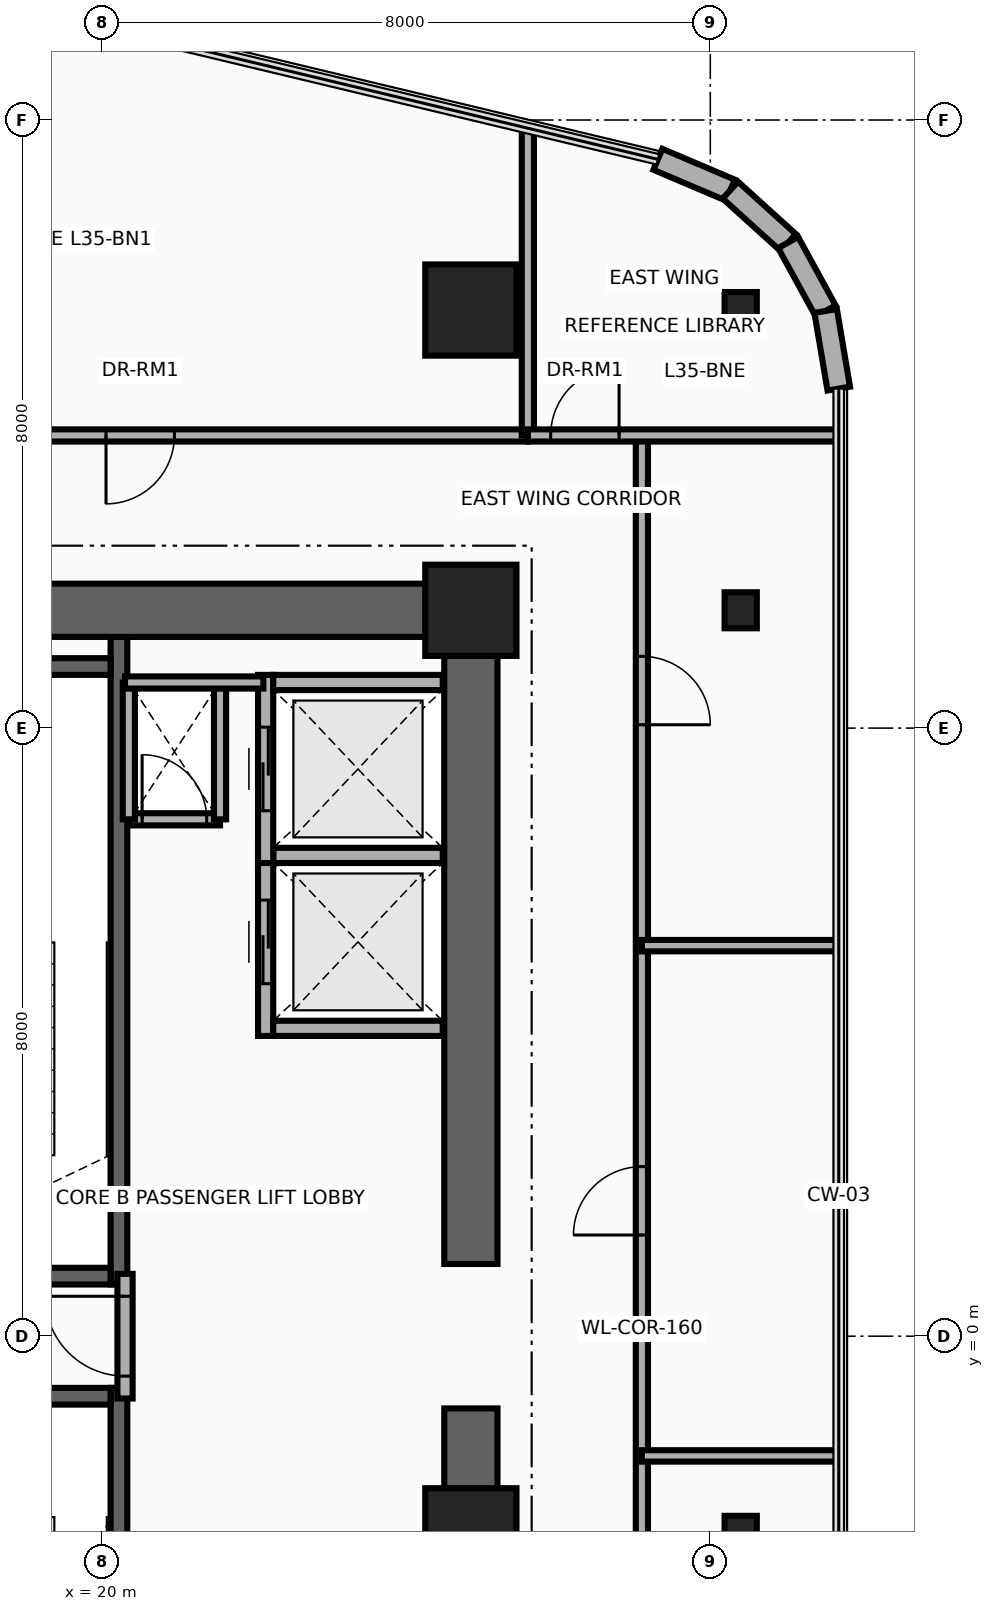
"""IFC4 building model, lengths in metres.
Left out: names, types, materials, properties, quantities, classifications, styles, units other than length and angle.
Written with IfcOpenShell. Run it as: python <this file> out.ifc"""

import sys

from ifc_helpers import new_model, si_unit, direction, frame, frame_2d, origin, origin_2d, place, context, subcontext, project, spatial, rectangle, i_section, extrude, source, transform, mapped, element, fill, save


model = new_model("IFC4")
c1 = context("Model", 3, precision=1e-05, world=origin(), true_north=direction((0.0, 1.0)))
c2 = subcontext(c1, "Body", "Model", "MODEL_VIEW")
j1 = project(units=[si_unit("LENGTHUNIT", "METRE"), si_unit("PLANEANGLEUNIT", "RADIAN")], contexts=[c1])
p1 = place(None, origin())
s1 = spatial("IfcSite", under=j1, at=p1, CompositionType="ELEMENT")
p2 = place(p1, origin())
s2 = spatial("IfcBuilding", under=s1, at=p2, CompositionType="ELEMENT")
p3 = place(p2, frame((0.0, 0.0, 139.0)))
s3 = spatial("IfcBuildingStorey", under=s2, at=p3, CompositionType="ELEMENT", Elevation=139.0)
p4 = place(p3, frame((20.22, 0.68, 0.0), z_axis=(0.0, 0.0, 1.0), x_axis=(0.0, 1.0, 0.0)))
e1 = element("IfcWall", 1, at=p4, inside=s3, PredefinedType="SHEAR", context=c2, shape_type="SweptSolid", body=[
    extrude(rectangle(XDim=8.52, YDim=0.22, at=frame_2d((4.26, 0.0))), origin(), (0.0, 0.0, 1.0), 3.46),
])
p5 = place(p3, frame((17.0, 0.79, 0.0), z_axis=(0.0, 0.0, 1.0), x_axis=(1.0, 0.0, 0.0)))
e2 = element("IfcWall", 2, at=p5, inside=s3, PredefinedType="SHEAR", context=c2, shape_type="SweptSolid", body=[
    extrude(rectangle(XDim=3.11, YDim=0.22, at=frame_2d((1.555, 0.0))), origin(), (0.0, 0.0, 1.0), 3.46),
])
p6 = place(p5, frame((0.95, 0.0, 0.0)))
e3 = element("IfcOpeningElement", 3, at=p6, cuts=e2, PredefinedType="OPENING", context=c2, shape_type="SweptSolid", body=[
    extrude(rectangle(XDim=1.1, YDim=2.15, at=frame_2d((0.55, 1.075))), frame((0.0, 0.125, 0.0), z_axis=(0.0, -1.0, 0.0), x_axis=(1.0, 0.0, 0.0)), (0.0, 0.0, 1.0), 0.25),
])
p7 = place(p3, frame((17.0, 8.81, 0.0), z_axis=(0.0, 0.0, 1.0), x_axis=(1.0, 0.0, 0.0)))
e4 = element("IfcWall", 4, at=p7, inside=s3, PredefinedType="SHEAR", context=c2, shape_type="SweptSolid", body=[
    extrude(rectangle(XDim=3.11, YDim=0.22, at=frame_2d((1.555, 0.0))), origin(), (0.0, 0.0, 1.0), 3.46),
])
p8 = place(p3, frame((20.22, -9.2, 0.0), z_axis=(0.0, 0.0, 1.0), x_axis=(0.0, 1.0, 0.0)))
e5 = element("IfcWall", 5, at=p8, inside=s3, PredefinedType="SHEAR", context=c2, shape_type="SweptSolid", body=[
    extrude(rectangle(XDim=8.52, YDim=0.22, at=frame_2d((4.26, 0.0))), origin(), (0.0, 0.0, 1.0), 3.46),
])
p9 = place(p3, frame((17.0, -0.79, 0.0), z_axis=(0.0, 0.0, 1.0), x_axis=(1.0, 0.0, 0.0)))
e6 = element("IfcWall", 6, at=p9, inside=s3, PredefinedType="SHEAR", context=c2, shape_type="SweptSolid", body=[
    extrude(rectangle(XDim=3.11, YDim=0.22, at=frame_2d((1.555, 0.0))), origin(), (0.0, 0.0, 1.0), 3.46),
])
p10 = place(p9, frame((0.95, 0.0, 0.0)))
e7 = element("IfcOpeningElement", 7, at=p10, cuts=e6, PredefinedType="OPENING", context=c2, shape_type="SweptSolid", body=[
    extrude(rectangle(XDim=1.1, YDim=2.15, at=frame_2d((0.55, 1.075))), frame((0.0, 0.125, 0.0), z_axis=(0.0, -1.0, 0.0), x_axis=(1.0, 0.0, 0.0)), (0.0, 0.0, 1.0), 0.25),
])
for number, where, z_axis, x_axis in (
    (8, (24.85, -9.9, 0.0), (0.0, 0.0, 1.0), (0.0, 1.0, 0.0)),
    (9, (24.85, 0.95, 0.0), (0.0, 0.0, 1.0), (0.0, 1.0, 0.0)),
):
    element("IfcWall", number, at=place(p3, frame(where, z_axis=z_axis, x_axis=x_axis)), inside=s3, PredefinedType="SHEAR", context=c2, shape_type="SweptSolid", body=[
        extrude(rectangle(XDim=8.95, YDim=0.7, at=frame_2d((4.475, 0.0))), origin(), (0.0, 0.0, 1.0), 3.46),
    ])
p11 = place(p3, frame((15.85, 9.55, 0.0), z_axis=(0.0, 0.0, 1.0), x_axis=(1.0, 0.0, 0.0)))
e10 = element("IfcWall", 10, at=p11, inside=s3, PredefinedType="SHEAR", context=c2, shape_type="SweptSolid", body=[
    extrude(rectangle(XDim=9.0, YDim=0.7, at=frame_2d((4.5, 0.0))), origin(), (0.0, 0.0, 1.0), 3.46),
])
m1 = source(origin(), c2, "Body", "SweptSolid", [
    extrude(rectangle(XDim=1.2, YDim=1.2, at=origin_2d()), origin(), (0.0, 0.0, 1.0), 3.7),
])
p12 = place(p3, frame((24.85, -2.6, 0.0), z_axis=(0.0, 0.0, 1.0), x_axis=(1.0, 0.0, 0.0)))
e11 = element("IfcColumn", 11, at=p12, inside=s3, PredefinedType="COLUMN", context=c2, shape_type="MappedRepresentation", body=[
    mapped(m1, transform((0.0, 0.0, 0.0), x_axis=(1.0, 0.0, 0.0), y_axis=(0.0, 1.0, 0.0), z_axis=(0.0, 0.0, 1.0), scale=1.0)),
])
m2 = source(origin(), c2, "Body", "SweptSolid", [
    extrude(i_section(OverallWidth=0.424, OverallDepth=0.474, WebThickness=0.048, FlangeThickness=0.077, at=origin_2d()), origin(), (0.0, 0.0, 1.0), 3.7),
])
p13 = place(p3, frame((28.4, -2.6, 0.0), z_axis=(0.0, 0.0, 1.0), x_axis=(1.0, 0.0, 0.0)))
e12 = element("IfcColumn", 12, at=p13, inside=s3, PredefinedType="COLUMN", context=c2, shape_type="MappedRepresentation", body=[
    mapped(m2, transform((0.0, 0.0, 0.0), x_axis=(1.0, 0.0, 0.0), y_axis=(0.0, 1.0, 0.0), z_axis=(0.0, 0.0, 1.0), scale=1.0)),
])
p14 = place(p3, frame((24.85, 9.55, 0.0), z_axis=(0.0, 0.0, 1.0), x_axis=(1.0, 0.0, 0.0)))
e13 = element("IfcColumn", 13, at=p14, inside=s3, PredefinedType="COLUMN", context=c2, shape_type="MappedRepresentation", body=[
    mapped(m1, transform((0.0, 0.0, 0.0), x_axis=(1.0, 0.0, 0.0), y_axis=(0.0, 1.0, 0.0), z_axis=(0.0, 0.0, 1.0), scale=1.0)),
])
p15 = place(p3, frame((28.4, 9.55, 0.0), z_axis=(0.0, 0.0, 1.0), x_axis=(1.0, 0.0, 0.0)))
e14 = element("IfcColumn", 14, at=p15, inside=s3, PredefinedType="COLUMN", context=c2, shape_type="MappedRepresentation", body=[
    mapped(m2, transform((0.0, 0.0, 0.0), x_axis=(1.0, 0.0, 0.0), y_axis=(0.0, 1.0, 0.0), z_axis=(0.0, 0.0, 1.0), scale=1.0)),
])
p16 = place(p3, frame((24.85, 13.5, 0.0), z_axis=(0.0, 0.0, 1.0), x_axis=(1.0, 0.0, 0.0)))
e15 = element("IfcColumn", 15, at=p16, inside=s3, PredefinedType="COLUMN", context=c2, shape_type="MappedRepresentation", body=[
    mapped(m1, transform((0.0, 0.0, 0.0), x_axis=(1.0, 0.0, 0.0), y_axis=(0.0, 1.0, 0.0), z_axis=(0.0, 0.0, 1.0), scale=1.0)),
])
p17 = place(p3, frame((28.4, 13.5, 0.0), z_axis=(0.0, 0.0, 1.0), x_axis=(1.0, 0.0, 0.0)))
e16 = element("IfcColumn", 16, at=p17, inside=s3, PredefinedType="COLUMN", context=c2, shape_type="MappedRepresentation", body=[
    mapped(m2, transform((0.0, 0.0, 0.0), x_axis=(1.0, 0.0, 0.0), y_axis=(0.0, 1.0, 0.0), z_axis=(0.0, 0.0, 1.0), scale=1.0)),
])
p18 = place(p3, frame((27.31, 15.483, 0.0), z_axis=(0.0, 0.0, 1.0), x_axis=(0.920250328759, -0.391330208927, 0.0)))
e17 = element("IfcWall", 17, at=p18, inside=s3, PredefinedType="SOLIDWALL", context=c2, shape_type="SweptSolid", body=[
    extrude(rectangle(XDim=1.036, YDim=0.3, at=frame_2d((0.518, 0.0))), origin(), (0.0, 0.0, 1.0), 3.46),
])
p19 = place(p3, frame((28.264, 15.077, 0.0), z_axis=(0.0, 0.0, 1.0), x_axis=(0.741208839713, -0.671274501178, 0.0)))
e18 = element("IfcWall", 18, at=p19, inside=s3, PredefinedType="SOLIDWALL", context=c2, shape_type="SweptSolid", body=[
    extrude(rectangle(XDim=1.026, YDim=0.3, at=frame_2d((0.513, 0.0))), origin(), (0.0, 0.0, 1.0), 3.46),
])
p20 = place(p3, frame((29.025, 14.388, 0.0), z_axis=(0.0, 0.0, 1.0), x_axis=(0.480284137298, -0.87711296163, 0.0)))
e19 = element("IfcWall", 19, at=p20, inside=s3, PredefinedType="SOLIDWALL", context=c2, shape_type="SweptSolid", body=[
    extrude(rectangle(XDim=1.027, YDim=0.3, at=frame_2d((0.513, 0.0))), origin(), (0.0, 0.0, 1.0), 3.46),
])
p21 = place(p3, frame((29.518, 13.488, 0.0), z_axis=(0.0, 0.0, 1.0), x_axis=(0.166156796952, -0.986099345313, 0.0)))
e20 = element("IfcWall", 20, at=p21, inside=s3, PredefinedType="SOLIDWALL", context=c2, shape_type="SweptSolid", body=[
    extrude(rectangle(XDim=1.036, YDim=0.3, at=frame_2d((0.518, 0.0))), origin(), (0.0, 0.0, 1.0), 3.46),
])
p22 = place(p3, frame((22.15, 3.95, 0.0), z_axis=(0.0, 0.0, 1.0), x_axis=(0.0, 1.0, 0.0)))
e21 = element("IfcWall", 21, at=p22, inside=s3, PredefinedType="MOVABLE", context=c2, shape_type="SweptSolid", body=[
    extrude(rectangle(XDim=2.475, YDim=0.2, at=frame_2d((1.238, 0.0))), origin(), (0.0, 0.0, 1.0), 3.46),
])
p23 = place(p22, frame((0.688, 0.0, 0.0)))
e22 = element("IfcOpeningElement", 22, at=p23, cuts=e21, PredefinedType="OPENING", context=c2, shape_type="SweptSolid", body=[
    extrude(rectangle(XDim=1.1, YDim=2.1, at=frame_2d((0.55, 1.05))), frame((0.0, 0.115, 0.0), z_axis=(0.0, -1.0, 0.0), x_axis=(1.0, 0.0, 0.0)), (0.0, 0.0, 1.0), 0.23),
])
for number, where, z_axis, x_axis in (
    (23, (22.25, 4.05, 0.0), (0.0, 0.0, 1.0), (1.0, 0.0, 0.0)),
    (24, (22.25, 6.325, 0.0), (0.0, 0.0, 1.0), (1.0, 0.0, 0.0)),
):
    element("IfcWall", number, at=place(p3, frame(where, z_axis=z_axis, x_axis=x_axis)), inside=s3, PredefinedType="MOVABLE", context=c2, shape_type="SweptSolid", body=[
        extrude(rectangle(XDim=2.23, YDim=0.2, at=frame_2d((1.115, 0.0))), origin(), (0.0, 0.0, 1.0), 2.245),
    ])
p24 = place(p3, frame((22.15, 6.225, 0.0), z_axis=(0.0, 0.0, 1.0), x_axis=(0.0, 1.0, 0.0)))
e25 = element("IfcWall", 25, at=p24, inside=s3, PredefinedType="MOVABLE", context=c2, shape_type="SweptSolid", body=[
    extrude(rectangle(XDim=2.475, YDim=0.2, at=frame_2d((1.237, 0.0))), origin(), (0.0, 0.0, 1.0), 3.46),
])
p25 = place(p24, frame((0.688, 0.0, 0.0)))
e26 = element("IfcOpeningElement", 26, at=p25, cuts=e25, PredefinedType="OPENING", context=c2, shape_type="SweptSolid", body=[
    extrude(rectangle(XDim=1.1, YDim=2.1, at=frame_2d((0.55, 1.05))), frame((0.0, 0.115, 0.0), z_axis=(0.0, -1.0, 0.0), x_axis=(1.0, 0.0, 0.0)), (0.0, 0.0, 1.0), 0.23),
])
p26 = place(p3, frame((22.25, 8.6, 0.0), z_axis=(0.0, 0.0, 1.0), x_axis=(1.0, 0.0, 0.0)))
e27 = element("IfcWall", 27, at=p26, inside=s3, PredefinedType="MOVABLE", context=c2, shape_type="SweptSolid", body=[
    extrude(rectangle(XDim=2.23, YDim=0.2, at=frame_2d((1.115, 0.0))), origin(), (0.0, 0.0, 1.0), 2.245),
])
p27 = place(p3, frame((20.3, -0.82, 0.0), z_axis=(0.0, 0.0, 1.0), x_axis=(0.0, 1.0, 0.0)))
e28 = element("IfcWall", 28, at=p27, inside=s3, PredefinedType="PARTITIONING", context=c2, shape_type="SweptSolid", body=[
    extrude(rectangle(XDim=1.64, YDim=0.2, at=frame_2d((0.82, 0.0))), origin(), (0.0, 0.0, 1.0), 3.46),
])
p28 = place(p27, frame((0.295, 0.0, 0.0)))
e29 = element("IfcOpeningElement", 29, at=p28, cuts=e28, PredefinedType="OPENING", context=c2, shape_type="SweptSolid", body=[
    extrude(rectangle(XDim=1.05, YDim=2.15, at=frame_2d((0.525, 1.075))), frame((0.0, 0.115, 0.0), z_axis=(0.0, -1.0, 0.0), x_axis=(1.0, 0.0, 0.0)), (0.0, 0.0, 1.0), 0.23),
])
p29 = place(p3, frame((20.35, 6.8, 0.0), z_axis=(0.0, 0.0, 1.0), x_axis=(1.0, 0.0, 0.0)))
e30 = element("IfcWall", 30, at=p29, inside=s3, PredefinedType="PARTITIONING", context=c2, shape_type="SweptSolid", body=[
    extrude(rectangle(XDim=1.2, YDim=0.16, at=frame_2d((0.6, 0.0))), origin(), (0.0, 0.0, 1.0), 3.46),
])
p30 = place(p29, frame((0.175, 0.0, 0.0)))
e31 = element("IfcOpeningElement", 31, at=p30, cuts=e30, PredefinedType="OPENING", context=c2, shape_type="SweptSolid", body=[
    extrude(rectangle(XDim=0.85, YDim=2.05, at=frame_2d((0.425, 1.025))), frame((0.0, 0.095, 0.0), z_axis=(0.0, -1.0, 0.0), x_axis=(1.0, 0.0, 0.0)), (0.0, 0.0, 1.0), 0.19),
])
for number, where, z_axis, x_axis in (
    (32, (21.55, 6.8, 0.0), (0.0, 0.0, 1.0), (0.0, 1.0, 0.0)),
    (33, (20.35, 6.8, 0.0), (0.0, 0.0, 1.0), (0.0, 1.0, 0.0)),
):
    element("IfcWall", number, at=place(p3, frame(where, z_axis=z_axis, x_axis=x_axis)), inside=s3, PredefinedType="PARTITIONING", context=c2, shape_type="SweptSolid", body=[
        extrude(rectangle(XDim=1.8, YDim=0.16, at=frame_2d((0.9, 0.0))), origin(), (0.0, 0.0, 1.0), 3.46),
    ])
p31 = place(p3, frame((20.3, 8.6, 0.0), z_axis=(0.0, 0.0, 1.0), x_axis=(1.0, 0.0, 0.0)))
e34 = element("IfcWall", 34, at=p31, inside=s3, PredefinedType="PARTITIONING", context=c2, shape_type="SweptSolid", body=[
    extrude(rectangle(XDim=1.82, YDim=0.16, at=frame_2d((0.91, 0.0))), origin(), (0.0, 0.0, 1.0), 3.46),
])
p32 = place(p3, frame((15.4, 11.85, 0.0), z_axis=(0.0, 0.0, 1.0), x_axis=(1.0, 0.0, 0.0)))
e35 = element("IfcWall", 35, at=p32, inside=s3, PredefinedType="PARTITIONING", context=c2, shape_type="SweptSolid", body=[
    extrude(rectangle(XDim=10.2, YDim=0.16, at=frame_2d((5.1, 0.0))), origin(), (0.0, 0.0, 1.0), 2.834),
])
p33 = place(p32, frame((4.65, 0.0, 0.0)))
e36 = element("IfcOpeningElement", 36, at=p33, cuts=e35, PredefinedType="OPENING", context=c2, shape_type="SweptSolid", body=[
    extrude(rectangle(XDim=0.9, YDim=2.1, at=frame_2d((0.45, 1.05))), frame((0.0, 0.095, 0.0), z_axis=(0.0, -1.0, 0.0), x_axis=(1.0, 0.0, 0.0)), (0.0, 0.0, 1.0), 0.19),
])
p34 = place(p3, frame((25.6, 11.85, 0.0), z_axis=(0.0, 0.0, 1.0), x_axis=(0.0, 1.0, 0.0)))
e37 = element("IfcWall", 37, at=p34, inside=s3, PredefinedType="PARTITIONING", context=c2, shape_type="SweptSolid", body=[
    extrude(rectangle(XDim=4.042, YDim=0.16, at=frame_2d((2.021, 0.0))), origin(), (0.0, 0.0, 1.0), 2.666),
])
p35 = place(p3, frame((27.1, -11.661, 0.0), z_axis=(0.0, 0.0, 1.0), x_axis=(0.0, 1.0, 0.0)))
e38 = element("IfcWall", 38, at=p35, inside=s3, PredefinedType="PARTITIONING", context=c2, shape_type="SweptSolid", body=[
    extrude(rectangle(XDim=23.511, YDim=0.16, at=frame_2d((11.755, 0.0))), origin(), (0.0, 0.0, 1.0), 2.666),
])
p36 = place(p35, frame((0.8, 0.0, 0.0)))
e39 = element("IfcOpeningElement", 39, at=p36, cuts=e38, PredefinedType="OPENING", context=c2, shape_type="SweptSolid", body=[
    extrude(rectangle(XDim=0.9, YDim=2.1, at=frame_2d((0.45, 1.05))), frame((0.0, 0.095, 0.0), z_axis=(0.0, -1.0, 0.0), x_axis=(1.0, 0.0, 0.0)), (0.0, 0.0, 1.0), 0.19),
])
p37 = place(p35, frame((6.28, 0.0, 0.0)))
e40 = element("IfcOpeningElement", 40, at=p37, cuts=e38, PredefinedType="OPENING", context=c2, shape_type="SweptSolid", body=[
    extrude(rectangle(XDim=0.9, YDim=2.1, at=frame_2d((0.45, 1.05))), frame((0.0, 0.095, 0.0), z_axis=(0.0, -1.0, 0.0), x_axis=(1.0, 0.0, 0.0)), (0.0, 0.0, 1.0), 0.19),
])
p38 = place(p35, frame((12.992, 0.0, 0.0)))
e41 = element("IfcOpeningElement", 41, at=p38, cuts=e38, PredefinedType="OPENING", context=c2, shape_type="SweptSolid", body=[
    extrude(rectangle(XDim=0.9, YDim=2.1, at=frame_2d((0.45, 1.05))), frame((0.0, 0.095, 0.0), z_axis=(0.0, -1.0, 0.0), x_axis=(1.0, 0.0, 0.0)), (0.0, 0.0, 1.0), 0.19),
])
p39 = place(p35, frame((19.705, 0.0, 0.0)))
e42 = element("IfcOpeningElement", 42, at=p39, cuts=e38, PredefinedType="OPENING", context=c2, shape_type="SweptSolid", body=[
    extrude(rectangle(XDim=0.9, YDim=2.1, at=frame_2d((0.45, 1.05))), frame((0.0, 0.095, 0.0), z_axis=(0.0, -1.0, 0.0), x_axis=(1.0, 0.0, 0.0)), (0.0, 0.0, 1.0), 0.19),
])
p40 = place(p3, frame((25.6, 11.85, 0.0), z_axis=(0.0, 0.0, 1.0), x_axis=(1.0, 0.0, 0.0)))
e43 = element("IfcWall", 43, at=p40, inside=s3, PredefinedType="PARTITIONING", context=c2, shape_type="SweptSolid", body=[
    extrude(rectangle(XDim=4.09, YDim=0.16, at=frame_2d((2.045, 0.0))), origin(), (0.0, 0.0, 1.0), 2.896),
])
p41 = place(p40, frame((0.3, 0.0, 0.0)))
e44 = element("IfcOpeningElement", 44, at=p41, cuts=e43, PredefinedType="OPENING", context=c2, shape_type="SweptSolid", body=[
    extrude(rectangle(XDim=0.9, YDim=2.1, at=frame_2d((0.45, 1.05))), frame((0.0, 0.095, 0.0), z_axis=(0.0, -1.0, 0.0), x_axis=(1.0, 0.0, 0.0)), (0.0, 0.0, 1.0), 0.19),
])
for number, where, z_axis, x_axis in (
    (45, (27.1, -1.575, 0.0), (0.0, 0.0, 1.0), (1.0, 0.0, 0.0)),
    (46, (27.1, 5.138, 0.0), (0.0, 0.0, 1.0), (1.0, 0.0, 0.0)),
):
    element("IfcWall", number, at=place(p3, frame(where, z_axis=z_axis, x_axis=x_axis)), inside=s3, PredefinedType="PARTITIONING", context=c2, shape_type="SweptSolid", body=[
        extrude(rectangle(XDim=2.59, YDim=0.15, at=frame_2d((1.295, 0.0))), origin(), (0.0, 0.0, 1.0), 2.896),
    ])
p42 = place(p23, origin())
e47 = element("IfcDoor", 47, at=p42, inside=s3, OperationType="DOUBLE_DOOR_SLIDING", PredefinedType="DOOR", context=c2, shape_type="SweptSolid", body=[
    extrude(rectangle(XDim=1.1, YDim=2.1, at=frame_2d((0.55, 1.05))), frame((0.0, 0.025, 0.0), z_axis=(0.0, -1.0, 0.0), x_axis=(1.0, 0.0, 0.0)), (0.0, 0.0, 1.0), 0.05),
])
fill(e22, e47)
p43 = place(p25, origin())
e48 = element("IfcDoor", 48, at=p43, inside=s3, OperationType="DOUBLE_DOOR_SLIDING", PredefinedType="DOOR", context=c2, shape_type="SweptSolid", body=[
    extrude(rectangle(XDim=1.1, YDim=2.1, at=frame_2d((0.55, 1.05))), frame((0.0, 0.025, 0.0), z_axis=(0.0, -1.0, 0.0), x_axis=(1.0, 0.0, 0.0)), (0.0, 0.0, 1.0), 0.05),
])
fill(e26, e48)
p44 = place(p28, origin())
e49 = element("IfcDoor", 49, at=p44, inside=s3, OperationType="SINGLE_SWING_RIGHT", PredefinedType="DOOR", context=c2, shape_type="SweptSolid", body=[
    extrude(rectangle(XDim=1.05, YDim=2.15, at=frame_2d((0.525, 1.075))), frame((0.0, 0.025, 0.0), z_axis=(0.0, -1.0, 0.0), x_axis=(1.0, 0.0, 0.0)), (0.0, 0.0, 1.0), 0.05),
])
fill(e29, e49)
p45 = place(p30, origin())
e50 = element("IfcDoor", 50, at=p45, inside=s3, OperationType="SINGLE_SWING_LEFT", PredefinedType="DOOR", context=c2, shape_type="SweptSolid", body=[
    extrude(rectangle(XDim=0.85, YDim=2.05, at=frame_2d((0.425, 1.025))), frame((0.0, 0.025, 0.0), z_axis=(0.0, -1.0, 0.0), x_axis=(1.0, 0.0, 0.0)), (0.0, 0.0, 1.0), 0.05),
])
fill(e31, e50)
p46 = place(p33, frame((0.9, 0.0, 0.0), z_axis=(0.0, 0.0, 1.0), x_axis=(-1.0, 0.0, 0.0)))
e51 = element("IfcDoor", 51, at=p46, inside=s3, OperationType="SINGLE_SWING_LEFT", PredefinedType="DOOR", context=c2, shape_type="SweptSolid", body=[
    extrude(rectangle(XDim=0.9, YDim=2.1, at=frame_2d((0.45, 1.05))), frame((0.0, 0.025, 0.0), z_axis=(0.0, -1.0, 0.0), x_axis=(1.0, 0.0, 0.0)), (0.0, 0.0, 1.0), 0.05),
])
fill(e36, e51)
p47 = place(p41, origin())
e52 = element("IfcDoor", 52, at=p47, inside=s3, OperationType="SINGLE_SWING_LEFT", PredefinedType="DOOR", context=c2, shape_type="SweptSolid", body=[
    extrude(rectangle(XDim=0.9, YDim=2.1, at=frame_2d((0.45, 1.05))), frame((0.0, 0.025, 0.0), z_axis=(0.0, -1.0, 0.0), x_axis=(1.0, 0.0, 0.0)), (0.0, 0.0, 1.0), 0.05),
])
fill(e44, e52)
p48 = place(p38, origin())
e53 = element("IfcDoor", 53, at=p48, inside=s3, OperationType="SINGLE_SWING_RIGHT", PredefinedType="DOOR", context=c2, shape_type="SweptSolid", body=[
    extrude(rectangle(XDim=0.9, YDim=2.1, at=frame_2d((0.45, 1.05))), frame((0.0, 0.025, 0.0), z_axis=(0.0, -1.0, 0.0), x_axis=(1.0, 0.0, 0.0)), (0.0, 0.0, 1.0), 0.05),
])
fill(e41, e53)
p49 = place(p39, frame((0.9, 0.0, 0.0), z_axis=(0.0, 0.0, 1.0), x_axis=(-1.0, 0.0, 0.0)))
e54 = element("IfcDoor", 54, at=p49, inside=s3, OperationType="SINGLE_SWING_LEFT", PredefinedType="DOOR", context=c2, shape_type="SweptSolid", body=[
    extrude(rectangle(XDim=0.9, YDim=2.1, at=frame_2d((0.45, 1.05))), frame((0.0, 0.025, 0.0), z_axis=(0.0, -1.0, 0.0), x_axis=(1.0, 0.0, 0.0)), (0.0, 0.0, 1.0), 0.05),
])
fill(e42, e54)
save(model, sys.argv[1])
